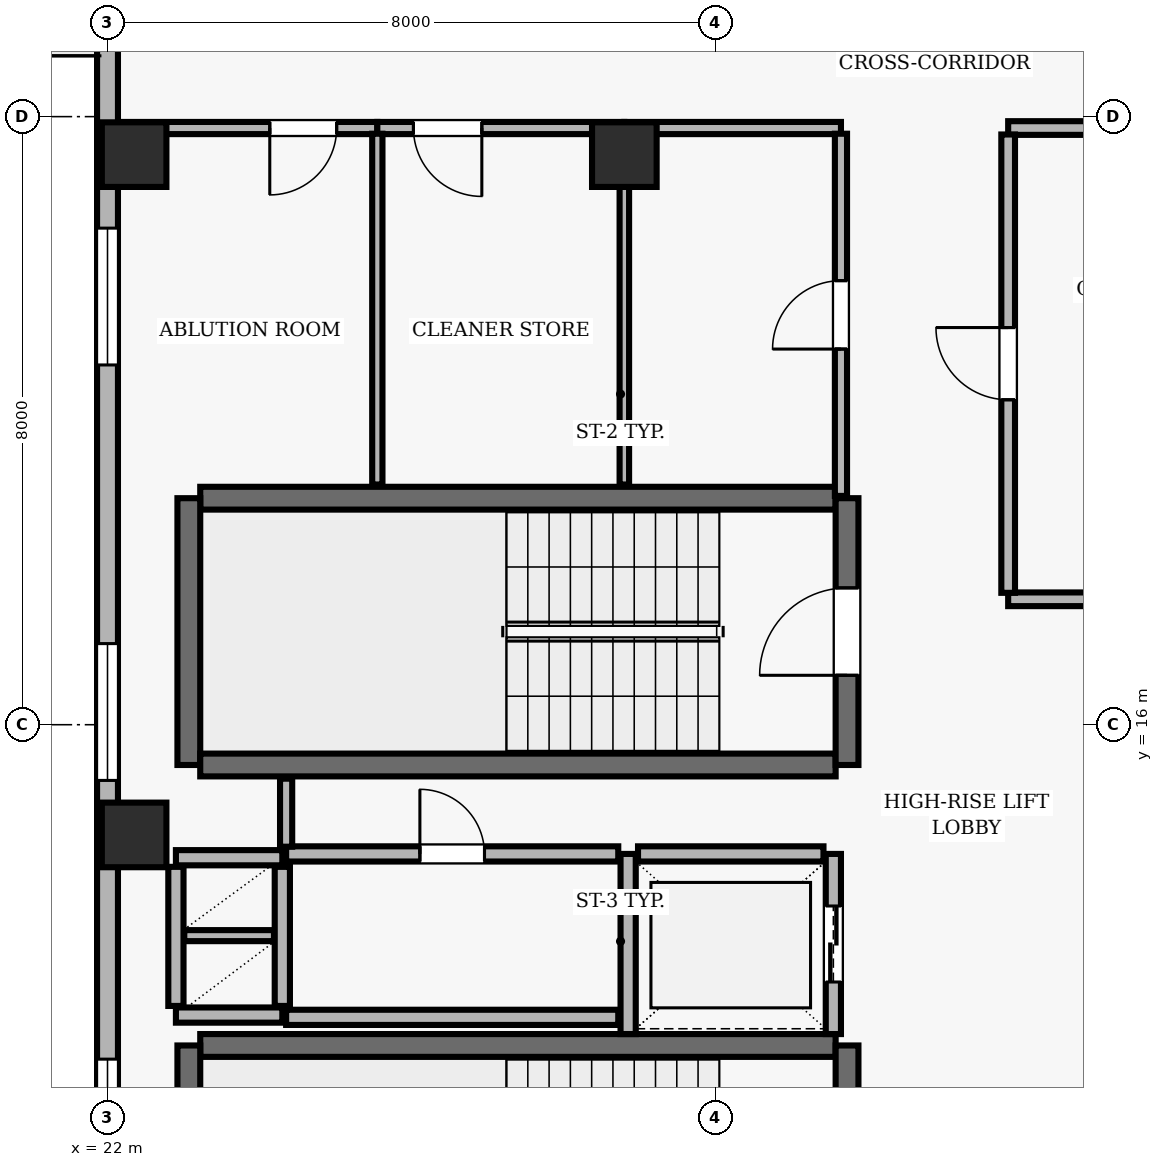
"""IFC4 building model, lengths in metres.
Left out: names, types, materials, properties, quantities, classifications, styles, units other than length and angle.
Written with IfcOpenShell. Run it as: python <this file> out.ifc"""

import sys

from ifc_helpers import new_model, si_unit, direction, frame, frame_2d, origin, origin_2d, place, context, subcontext, project, spatial, rectangle, extrude, element, fill, save


model = new_model("IFC4")
c1 = context("Model", 3, precision=1e-05, world=origin(), true_north=direction((0.0, 1.0)))
c2 = subcontext(c1, "Body", "Model", "MODEL_VIEW")
j1 = project(units=[si_unit("LENGTHUNIT", "METRE"), si_unit("PLANEANGLEUNIT", "RADIAN")], contexts=[c1])
p1 = place(None, origin())
s1 = spatial("IfcSite", under=j1, at=p1, CompositionType="ELEMENT")
p2 = place(p1, origin())
s2 = spatial("IfcBuilding", under=s1, at=p2, CompositionType="ELEMENT")
p3 = place(p2, frame((0.0, 0.0, 256.0)))
s3 = spatial("IfcBuildingStorey", under=s2, at=p3, CompositionType="ELEMENT", Elevation=256.0)
for number, where, z_axis, x_axis in (
    (1, (22.35, 14.55, 0.0), (0.0, 0.0, 1.0), (1.0, 0.0, 0.0)),
    (2, (22.35, 23.5, 0.0), (0.0, 0.0, 1.0), (1.0, 0.0, 0.0)),
    (3, (28.8, 23.5, 0.0), (0.0, 0.0, 1.0), (1.0, 0.0, 0.0)),
):
    element("IfcColumn", number, at=place(p3, frame(where, z_axis=z_axis, x_axis=x_axis)), inside=s3, PredefinedType="COLUMN", context=c2, shape_type="SweptSolid", body=[
        extrude(rectangle(XDim=0.85, YDim=0.85, at=origin_2d()), origin(), (0.0, 0.0, 1.0), 3.9),
    ])
p4 = place(p3, frame((22.0, 35.3, 0.0), z_axis=(0.0, 0.0, 1.0), x_axis=(0.0, -1.0, 0.0)))
e4 = element("IfcWall", 4, at=p4, inside=s3, PredefinedType="SOLIDWALL", context=c2, shape_type="SweptSolid", body=[
    extrude(rectangle(XDim=32.8, YDim=0.275, at=frame_2d((16.4, 0.0))), origin(), (0.0, 0.0, 1.0), 3.69),
])
p5 = place(p4, frame((7.3, 0.0, 0.0)))
e5 = element("IfcOpeningElement", 5, at=p5, cuts=e4, PredefinedType="OPENING", context=c2, shape_type="SweptSolid", body=[
    extrude(rectangle(XDim=1.0, YDim=2.2, at=frame_2d((0.5, 1.1))), frame((0.0, 0.147, 0.0), z_axis=(0.0, -1.0, 0.0), x_axis=(1.0, 0.0, 0.0)), (0.0, 0.0, 1.0), 0.295),
])
p6 = place(p4, frame((1.833, 0.0, 0.9)))
e6 = element("IfcOpeningElement", 6, at=p6, cuts=e4, PredefinedType="OPENING", context=c2, shape_type="SweptSolid", body=[
    extrude(rectangle(XDim=1.8, YDim=1.6, at=frame_2d((0.9, 0.8))), frame((0.0, 0.147, 0.0), z_axis=(0.0, -1.0, 0.0), x_axis=(1.0, 0.0, 0.0)), (0.0, 0.0, 1.0), 0.295),
])
p7 = place(p4, frame((12.767, 0.0, 0.9)))
e7 = element("IfcOpeningElement", 7, at=p7, cuts=e4, PredefinedType="OPENING", context=c2, shape_type="SweptSolid", body=[
    extrude(rectangle(XDim=1.8, YDim=1.6, at=frame_2d((0.9, 0.8))), frame((0.0, 0.147, 0.0), z_axis=(0.0, -1.0, 0.0), x_axis=(1.0, 0.0, 0.0)), (0.0, 0.0, 1.0), 0.295),
])
p8 = place(p4, frame((18.233, 0.0, 0.9)))
e8 = element("IfcOpeningElement", 8, at=p8, cuts=e4, PredefinedType="OPENING", context=c2, shape_type="SweptSolid", body=[
    extrude(rectangle(XDim=1.8, YDim=1.6, at=frame_2d((0.9, 0.8))), frame((0.0, 0.147, 0.0), z_axis=(0.0, -1.0, 0.0), x_axis=(1.0, 0.0, 0.0)), (0.0, 0.0, 1.0), 0.295),
])
p9 = place(p4, frame((23.7, 0.0, 0.9)))
e9 = element("IfcOpeningElement", 9, at=p9, cuts=e4, PredefinedType="OPENING", context=c2, shape_type="SweptSolid", body=[
    extrude(rectangle(XDim=1.8, YDim=1.6, at=frame_2d((0.9, 0.8))), frame((0.0, 0.147, 0.0), z_axis=(0.0, -1.0, 0.0), x_axis=(1.0, 0.0, 0.0)), (0.0, 0.0, 1.0), 0.295),
])
p10 = place(p3, frame((31.58, 18.98, 0.0), z_axis=(0.0, 0.0, 1.0), x_axis=(-1.0, 0.0, 0.0)))
e10 = element("IfcWall", 10, at=p10, inside=s3, PredefinedType="SHEAR", context=c2, shape_type="SweptSolid", body=[
    extrude(rectangle(XDim=8.36, YDim=0.3, at=frame_2d((4.18, 0.0))), origin(), (0.0, 0.0, 1.0), 3.69),
])
p11 = place(p3, frame((23.07, 18.98, 0.0), z_axis=(0.0, 0.0, 1.0), x_axis=(0.0, -1.0, 0.0)))
e11 = element("IfcWall", 11, at=p11, inside=s3, PredefinedType="SHEAR", context=c2, shape_type="SweptSolid", body=[
    extrude(rectangle(XDim=3.51, YDim=0.3, at=frame_2d((1.755, 0.0))), origin(), (0.0, 0.0, 1.0), 3.69),
])
p12 = place(p3, frame((23.22, 15.47, 0.0), z_axis=(0.0, 0.0, 1.0), x_axis=(1.0, 0.0, 0.0)))
e12 = element("IfcWall", 12, at=p12, inside=s3, PredefinedType="SHEAR", context=c2, shape_type="SweptSolid", body=[
    extrude(rectangle(XDim=8.36, YDim=0.3, at=frame_2d((4.18, 0.0))), origin(), (0.0, 0.0, 1.0), 3.69),
])
p13 = place(p3, frame((31.73, 15.47, 0.0), z_axis=(0.0, 0.0, 1.0), x_axis=(0.0, 1.0, 0.0)))
e13 = element("IfcWall", 13, at=p13, inside=s3, PredefinedType="SHEAR", context=c2, shape_type="SweptSolid", body=[
    extrude(rectangle(XDim=3.51, YDim=0.3, at=frame_2d((1.755, 0.0))), origin(), (0.0, 0.0, 1.0), 3.69),
])
p14 = place(p13, frame((1.18, 0.0, 0.0)))
e14 = element("IfcOpeningElement", 14, at=p14, cuts=e13, PredefinedType="OPENING", context=c2, shape_type="SweptSolid", body=[
    extrude(rectangle(XDim=1.15, YDim=2.15, at=frame_2d((0.575, 1.075))), frame((0.0, 0.16, 0.0), z_axis=(0.0, -1.0, 0.0), x_axis=(1.0, 0.0, 0.0)), (0.0, 0.0, 1.0), 0.32),
])
p15 = place(p3, frame((31.58, 11.78, 0.0), z_axis=(0.0, 0.0, 1.0), x_axis=(-1.0, 0.0, 0.0)))
e15 = element("IfcWall", 15, at=p15, inside=s3, PredefinedType="SHEAR", context=c2, shape_type="SweptSolid", body=[
    extrude(rectangle(XDim=8.36, YDim=0.3, at=frame_2d((4.18, 0.0))), origin(), (0.0, 0.0, 1.0), 3.69),
])
p16 = place(p3, frame((23.07, 11.78, 0.0), z_axis=(0.0, 0.0, 1.0), x_axis=(0.0, -1.0, 0.0)))
e16 = element("IfcWall", 16, at=p16, inside=s3, PredefinedType="SHEAR", context=c2, shape_type="SweptSolid", body=[
    extrude(rectangle(XDim=3.51, YDim=0.3, at=frame_2d((1.755, 0.0))), origin(), (0.0, 0.0, 1.0), 3.69),
])
p17 = place(p3, frame((31.73, 8.27, 0.0), z_axis=(0.0, 0.0, 1.0), x_axis=(0.0, 1.0, 0.0)))
e17 = element("IfcWall", 17, at=p17, inside=s3, PredefinedType="SHEAR", context=c2, shape_type="SweptSolid", body=[
    extrude(rectangle(XDim=3.51, YDim=0.3, at=frame_2d((1.755, 0.0))), origin(), (0.0, 0.0, 1.0), 3.69),
])
p18 = place(p17, frame((1.18, 0.0, 0.0)))
e18 = element("IfcOpeningElement", 18, at=p18, cuts=e17, PredefinedType="OPENING", context=c2, shape_type="SweptSolid", body=[
    extrude(rectangle(XDim=1.15, YDim=2.15, at=frame_2d((0.575, 1.075))), frame((0.0, 0.16, 0.0), z_axis=(0.0, -1.0, 0.0), x_axis=(1.0, 0.0, 0.0)), (0.0, 0.0, 1.0), 0.32),
])
p19 = place(p3, frame((28.85, 14.3, 0.0), z_axis=(0.0, 0.0, 1.0), x_axis=(0.0, -1.0, 0.0)))
e19 = element("IfcWall", 19, at=p19, inside=s3, PredefinedType="SOLIDWALL", context=c2, shape_type="SweptSolid", body=[
    extrude(rectangle(XDim=2.37, YDim=0.2, at=frame_2d((1.185, 0.0))), origin(), (0.0, 0.0, 1.0), 3.69),
])
p20 = place(p3, frame((31.55, 11.93, 0.0), z_axis=(0.0, 0.0, 1.0), x_axis=(0.0, 1.0, 0.0)))
e20 = element("IfcWall", 20, at=p20, inside=s3, PredefinedType="SOLIDWALL", context=c2, shape_type="SweptSolid", body=[
    extrude(rectangle(XDim=2.37, YDim=0.2, at=frame_2d((1.185, 0.0))), origin(), (0.0, 0.0, 1.0), 3.69),
])
p21 = place(p20, frame((0.685, 0.0, 0.0)))
e21 = element("IfcOpeningElement", 21, at=p21, cuts=e20, PredefinedType="OPENING", context=c2, shape_type="SweptSolid", body=[
    extrude(rectangle(XDim=1.0, YDim=2.1, at=frame_2d((0.5, 1.05))), frame((0.0, 0.11, 0.0), z_axis=(0.0, -1.0, 0.0), x_axis=(1.0, 0.0, 0.0)), (0.0, 0.0, 1.0), 0.22),
])
p22 = place(p3, frame((31.42, 14.3, 0.0), z_axis=(0.0, 0.0, 1.0), x_axis=(-1.0, 0.0, 0.0)))
e22 = element("IfcWall", 22, at=p22, inside=s3, PredefinedType="SOLIDWALL", context=c2, shape_type="SweptSolid", body=[
    extrude(rectangle(XDim=2.44, YDim=0.2, at=frame_2d((1.22, 0.0))), origin(), (0.0, 0.0, 1.0), 3.69),
])
for number, where, z_axis, x_axis in (
    (23, (22.9, 14.25, 0.0), (0.0, 0.0, 1.0), (1.0, 0.0, 0.0)),
    (24, (22.9, 12.18, 0.0), (0.0, 0.0, 1.0), (1.0, 0.0, 0.0)),
):
    element("IfcWall", number, at=place(p3, frame(where, z_axis=z_axis, x_axis=x_axis)), inside=s3, PredefinedType="SOLIDWALL", context=c2, shape_type="SweptSolid", body=[
        extrude(rectangle(XDim=1.4, YDim=0.2, at=frame_2d((0.7, 0.0))), origin(), (0.0, 0.0, 1.0), 3.69),
    ])
for number, where, z_axis, x_axis in (
    (25, (24.3, 12.3, 0.0), (0.0, 0.0, 1.0), (0.0, 1.0, 0.0)),
    (26, (22.9, 12.3, 0.0), (0.0, 0.0, 1.0), (0.0, 1.0, 0.0)),
):
    element("IfcWall", number, at=place(p3, frame(where, z_axis=z_axis, x_axis=x_axis)), inside=s3, PredefinedType="SOLIDWALL", context=c2, shape_type="SweptSolid", body=[
        extrude(rectangle(XDim=1.83, YDim=0.2, at=frame_2d((0.915, 0.0))), origin(), (0.0, 0.0, 1.0), 3.69),
    ])
p23 = place(p3, frame((23.01, 13.225, 0.0), z_axis=(0.0, 0.0, 1.0), x_axis=(1.0, 0.0, 0.0)))
e27 = element("IfcWall", 27, at=p23, inside=s3, PredefinedType="PARTITIONING", context=c2, shape_type="SweptSolid", body=[
    extrude(rectangle(XDim=1.18, YDim=0.145, at=frame_2d((0.59, 0.0))), origin(), (0.0, 0.0, 1.0), 3.69),
])
p24 = place(p3, frame((24.35, 12.15, 0.0), z_axis=(0.0, 0.0, 1.0), x_axis=(1.0, 0.0, 0.0)))
e28 = element("IfcWall", 28, at=p24, inside=s3, PredefinedType="SOLIDWALL", context=c2, shape_type="SweptSolid", body=[
    extrude(rectangle(XDim=4.37, YDim=0.2, at=frame_2d((2.185, 0.0))), origin(), (0.0, 0.0, 1.0), 3.69),
])
p25 = place(p3, frame((24.35, 14.3, 0.0), z_axis=(0.0, 0.0, 1.0), x_axis=(1.0, 0.0, 0.0)))
e29 = element("IfcWall", 29, at=p25, inside=s3, PredefinedType="SOLIDWALL", context=c2, shape_type="SweptSolid", body=[
    extrude(rectangle(XDim=4.37, YDim=0.2, at=frame_2d((2.185, 0.0))), origin(), (0.0, 0.0, 1.0), 3.69),
])
p26 = place(p25, frame((1.76, 0.0, 0.0)))
e30 = element("IfcOpeningElement", 30, at=p26, cuts=e29, PredefinedType="OPENING", context=c2, shape_type="SweptSolid", body=[
    extrude(rectangle(XDim=0.85, YDim=2.1, at=frame_2d((0.425, 1.05))), frame((0.0, 0.11, 0.0), z_axis=(0.0, -1.0, 0.0), x_axis=(1.0, 0.0, 0.0)), (0.0, 0.0, 1.0), 0.22),
])
p27 = place(p3, frame((25.55, 23.85, 0.0), z_axis=(0.0, 0.0, 1.0), x_axis=(-1.0, 0.0, 0.0)))
e31 = element("IfcWall", 31, at=p27, inside=s3, PredefinedType="PARTITIONING", context=c2, shape_type="SweptSolid", body=[
    extrude(rectangle(XDim=3.35, YDim=0.16, at=frame_2d((1.675, 0.0))), origin(), (0.0, 0.0, 1.0), 3.221),
])
p28 = place(p27, frame((0.535, 0.0, 0.0)))
e32 = element("IfcOpeningElement", 32, at=p28, cuts=e31, PredefinedType="OPENING", context=c2, shape_type="SweptSolid", body=[
    extrude(rectangle(XDim=0.88, YDim=2.1, at=frame_2d((0.44, 1.05))), frame((0.0, 0.09, 0.0), z_axis=(0.0, -1.0, 0.0), x_axis=(1.0, 0.0, 0.0)), (0.0, 0.0, 1.0), 0.18),
])
p29 = place(p3, frame((28.8, 23.85, 0.0), z_axis=(0.0, 0.0, 1.0), x_axis=(-1.0, 0.0, 0.0)))
e33 = element("IfcWall", 33, at=p29, inside=s3, PredefinedType="PARTITIONING", context=c2, shape_type="SweptSolid", body=[
    extrude(rectangle(XDim=3.25, YDim=0.16, at=frame_2d((1.625, 0.0))), origin(), (0.0, 0.0, 1.0), 3.221),
])
p30 = place(p29, frame((1.875, 0.0, 0.0)))
e34 = element("IfcOpeningElement", 34, at=p30, cuts=e33, PredefinedType="OPENING", context=c2, shape_type="SweptSolid", body=[
    extrude(rectangle(XDim=0.9, YDim=2.1, at=frame_2d((0.45, 1.05))), frame((0.0, 0.09, 0.0), z_axis=(0.0, -1.0, 0.0), x_axis=(1.0, 0.0, 0.0)), (0.0, 0.0, 1.0), 0.18),
])
p31 = place(p3, frame((31.65, 23.85, 0.0), z_axis=(0.0, 0.0, 1.0), x_axis=(-1.0, 0.0, 0.0)))
e35 = element("IfcWall", 35, at=p31, inside=s3, PredefinedType="PARTITIONING", context=c2, shape_type="SweptSolid", body=[
    extrude(rectangle(XDim=2.85, YDim=0.16, at=frame_2d((1.425, 0.0))), origin(), (0.0, 0.0, 1.0), 3.221),
])
p32 = place(p3, frame((33.85, 17.65, 0.0), z_axis=(0.0, 0.0, 1.0), x_axis=(1.0, 0.0, 0.0)))
e36 = element("IfcWall", 36, at=p32, inside=s3, PredefinedType="PARTITIONING", context=c2, shape_type="SweptSolid", body=[
    extrude(rectangle(XDim=1.3, YDim=0.18, at=frame_2d((0.65, 0.0))), origin(), (0.0, 0.0, 1.0), 3.69),
])
p33 = place(p3, frame((37.85, 23.85, 0.0), z_axis=(0.0, 0.0, 1.0), x_axis=(-1.0, 0.0, 0.0)))
e37 = element("IfcWall", 37, at=p33, inside=s3, PredefinedType="PARTITIONING", context=c2, shape_type="SweptSolid", body=[
    extrude(rectangle(XDim=4.0, YDim=0.18, at=frame_2d((2.0, 0.0))), origin(), (0.0, 0.0, 1.0), 3.221),
])
p34 = place(p3, frame((24.35, 15.29, 0.0), z_axis=(0.0, 0.0, 1.0), x_axis=(0.0, -1.0, 0.0)))
e38 = element("IfcWall", 38, at=p34, inside=s3, PredefinedType="PARTITIONING", context=c2, shape_type="SweptSolid", body=[
    extrude(rectangle(XDim=0.895, YDim=0.16, at=frame_2d((0.448, 0.0))), origin(), (0.0, 0.0, 1.0), 3.69),
])
p35 = place(p3, frame((25.55, 19.16, 0.0), z_axis=(0.0, 0.0, 1.0), x_axis=(0.0, 1.0, 0.0)))
e39 = element("IfcWall", 39, at=p35, inside=s3, PredefinedType="PARTITIONING", context=c2, shape_type="SweptSolid", body=[
    extrude(rectangle(XDim=4.615, YDim=0.135, at=frame_2d((2.308, 0.0))), origin(), (0.0, 0.0, 1.0), 3.69),
])
p36 = place(p3, frame((28.8, 23.775, 0.0), z_axis=(0.0, 0.0, 1.0), x_axis=(0.0, -1.0, 0.0)))
e40 = element("IfcWall", 40, at=p36, inside=s3, PredefinedType="PARTITIONING", context=c2, shape_type="SweptSolid", body=[
    extrude(rectangle(XDim=4.615, YDim=0.125, at=frame_2d((2.308, 0.0))), origin(), (0.0, 0.0, 1.0), 3.69),
])
p37 = place(p3, frame((31.65, 19.01, 0.0), z_axis=(0.0, 0.0, 1.0), x_axis=(0.0, 1.0, 0.0)))
e41 = element("IfcWall", 41, at=p37, inside=s3, PredefinedType="PARTITIONING", context=c2, shape_type="SweptSolid", body=[
    extrude(rectangle(XDim=4.765, YDim=0.16, at=frame_2d((2.382, 0.0))), origin(), (0.0, 0.0, 1.0), 3.69),
])
p38 = place(p37, frame((1.932, 0.0, 0.0)))
e42 = element("IfcOpeningElement", 42, at=p38, cuts=e41, PredefinedType="OPENING", context=c2, shape_type="SweptSolid", body=[
    extrude(rectangle(XDim=0.9, YDim=2.1, at=frame_2d((0.45, 1.05))), frame((0.0, 0.09, 0.0), z_axis=(0.0, -1.0, 0.0), x_axis=(1.0, 0.0, 0.0)), (0.0, 0.0, 1.0), 0.18),
])
p39 = place(p3, frame((33.85, 17.735, 0.0), z_axis=(0.0, 0.0, 1.0), x_axis=(0.0, 1.0, 0.0)))
e43 = element("IfcWall", 43, at=p39, inside=s3, PredefinedType="PARTITIONING", context=c2, shape_type="SweptSolid", body=[
    extrude(rectangle(XDim=6.03, YDim=0.18, at=frame_2d((3.015, 0.0))), origin(), (0.0, 0.0, 1.0), 3.69),
])
p40 = place(p39, frame((2.54, 0.0, 0.0)))
e44 = element("IfcOpeningElement", 44, at=p40, cuts=e43, PredefinedType="OPENING", context=c2, shape_type="SweptSolid", body=[
    extrude(rectangle(XDim=0.95, YDim=2.1, at=frame_2d((0.475, 1.05))), frame((0.0, 0.1, 0.0), z_axis=(0.0, -1.0, 0.0), x_axis=(1.0, 0.0, 0.0)), (0.0, 0.0, 1.0), 0.2),
])
p41 = place(p7, origin())
e45 = element("IfcWindow", 45, at=p41, inside=s3, PartitioningType="SINGLE_PANEL", PredefinedType="WINDOW", context=c2, shape_type="SweptSolid", body=[
    extrude(rectangle(XDim=1.8, YDim=1.6, at=frame_2d((0.9, 0.8))), frame((0.0, 0.03, 0.0), z_axis=(0.0, -1.0, 0.0), x_axis=(1.0, 0.0, 0.0)), (0.0, 0.0, 1.0), 0.06),
])
fill(e7, e45)
p42 = place(p8, origin())
e46 = element("IfcWindow", 46, at=p42, inside=s3, PartitioningType="SINGLE_PANEL", PredefinedType="WINDOW", context=c2, shape_type="SweptSolid", body=[
    extrude(rectangle(XDim=1.8, YDim=1.6, at=frame_2d((0.9, 0.8))), frame((0.0, 0.03, 0.0), z_axis=(0.0, -1.0, 0.0), x_axis=(1.0, 0.0, 0.0)), (0.0, 0.0, 1.0), 0.06),
])
fill(e8, e46)
p43 = place(p9, origin())
e47 = element("IfcWindow", 47, at=p43, inside=s3, PartitioningType="SINGLE_PANEL", PredefinedType="WINDOW", context=c2, shape_type="SweptSolid", body=[
    extrude(rectangle(XDim=1.8, YDim=1.6, at=frame_2d((0.9, 0.8))), frame((0.0, 0.03, 0.0), z_axis=(0.0, -1.0, 0.0), x_axis=(1.0, 0.0, 0.0)), (0.0, 0.0, 1.0), 0.06),
])
fill(e9, e47)
p44 = place(p14, origin())
e48 = element("IfcDoor", 48, at=p44, inside=s3, OperationType="SINGLE_SWING_LEFT", PredefinedType="DOOR", context=c2, shape_type="SweptSolid", body=[
    extrude(rectangle(XDim=1.15, YDim=2.15, at=frame_2d((0.575, 1.075))), frame((0.0, 0.025, 0.0), z_axis=(0.0, -1.0, 0.0), x_axis=(1.0, 0.0, 0.0)), (0.0, 0.0, 1.0), 0.05),
])
fill(e14, e48)
p45 = place(p21, origin())
e49 = element("IfcDoor", 49, at=p45, inside=s3, OperationType="DOUBLE_DOOR_SLIDING", PredefinedType="DOOR", context=c2, shape_type="SweptSolid", body=[
    extrude(rectangle(XDim=1.0, YDim=2.1, at=frame_2d((0.5, 1.05))), frame((0.0, 0.025, 0.0), z_axis=(0.0, -1.0, 0.0), x_axis=(1.0, 0.0, 0.0)), (0.0, 0.0, 1.0), 0.05),
])
fill(e21, e49)
p46 = place(p40, origin())
e50 = element("IfcDoor", 50, at=p46, inside=s3, OperationType="SINGLE_SWING_RIGHT", PredefinedType="DOOR", context=c2, shape_type="SweptSolid", body=[
    extrude(rectangle(XDim=0.95, YDim=2.1, at=frame_2d((0.475, 1.05))), frame((0.0, 0.025, 0.0), z_axis=(0.0, -1.0, 0.0), x_axis=(1.0, 0.0, 0.0)), (0.0, 0.0, 1.0), 0.05),
])
fill(e44, e50)
p47 = place(p38, origin())
e51 = element("IfcDoor", 51, at=p47, inside=s3, OperationType="SINGLE_SWING_LEFT", PredefinedType="DOOR", context=c2, shape_type="SweptSolid", body=[
    extrude(rectangle(XDim=0.9, YDim=2.1, at=frame_2d((0.45, 1.05))), frame((0.0, 0.025, 0.0), z_axis=(0.0, -1.0, 0.0), x_axis=(1.0, 0.0, 0.0)), (0.0, 0.0, 1.0), 0.05),
])
fill(e42, e51)
p48 = place(p26, origin())
e52 = element("IfcDoor", 52, at=p48, inside=s3, OperationType="SINGLE_SWING_LEFT", PredefinedType="DOOR", context=c2, shape_type="SweptSolid", body=[
    extrude(rectangle(XDim=0.85, YDim=2.1, at=frame_2d((0.425, 1.05))), frame((0.0, 0.025, 0.0), z_axis=(0.0, -1.0, 0.0), x_axis=(1.0, 0.0, 0.0)), (0.0, 0.0, 1.0), 0.05),
])
fill(e30, e52)
p49 = place(p28, origin())
e53 = element("IfcDoor", 53, at=p49, inside=s3, OperationType="SINGLE_SWING_RIGHT", PredefinedType="DOOR", context=c2, shape_type="SweptSolid", body=[
    extrude(rectangle(XDim=0.88, YDim=2.1, at=frame_2d((0.44, 1.05))), frame((0.0, 0.025, 0.0), z_axis=(0.0, -1.0, 0.0), x_axis=(1.0, 0.0, 0.0)), (0.0, 0.0, 1.0), 0.05),
])
fill(e32, e53)
p50 = place(p30, origin())
e54 = element("IfcDoor", 54, at=p50, inside=s3, OperationType="SINGLE_SWING_LEFT", PredefinedType="DOOR", context=c2, shape_type="SweptSolid", body=[
    extrude(rectangle(XDim=0.9, YDim=2.1, at=frame_2d((0.45, 1.05))), frame((0.0, 0.025, 0.0), z_axis=(0.0, -1.0, 0.0), x_axis=(1.0, 0.0, 0.0)), (0.0, 0.0, 1.0), 0.05),
])
fill(e34, e54)
save(model, sys.argv[1])
